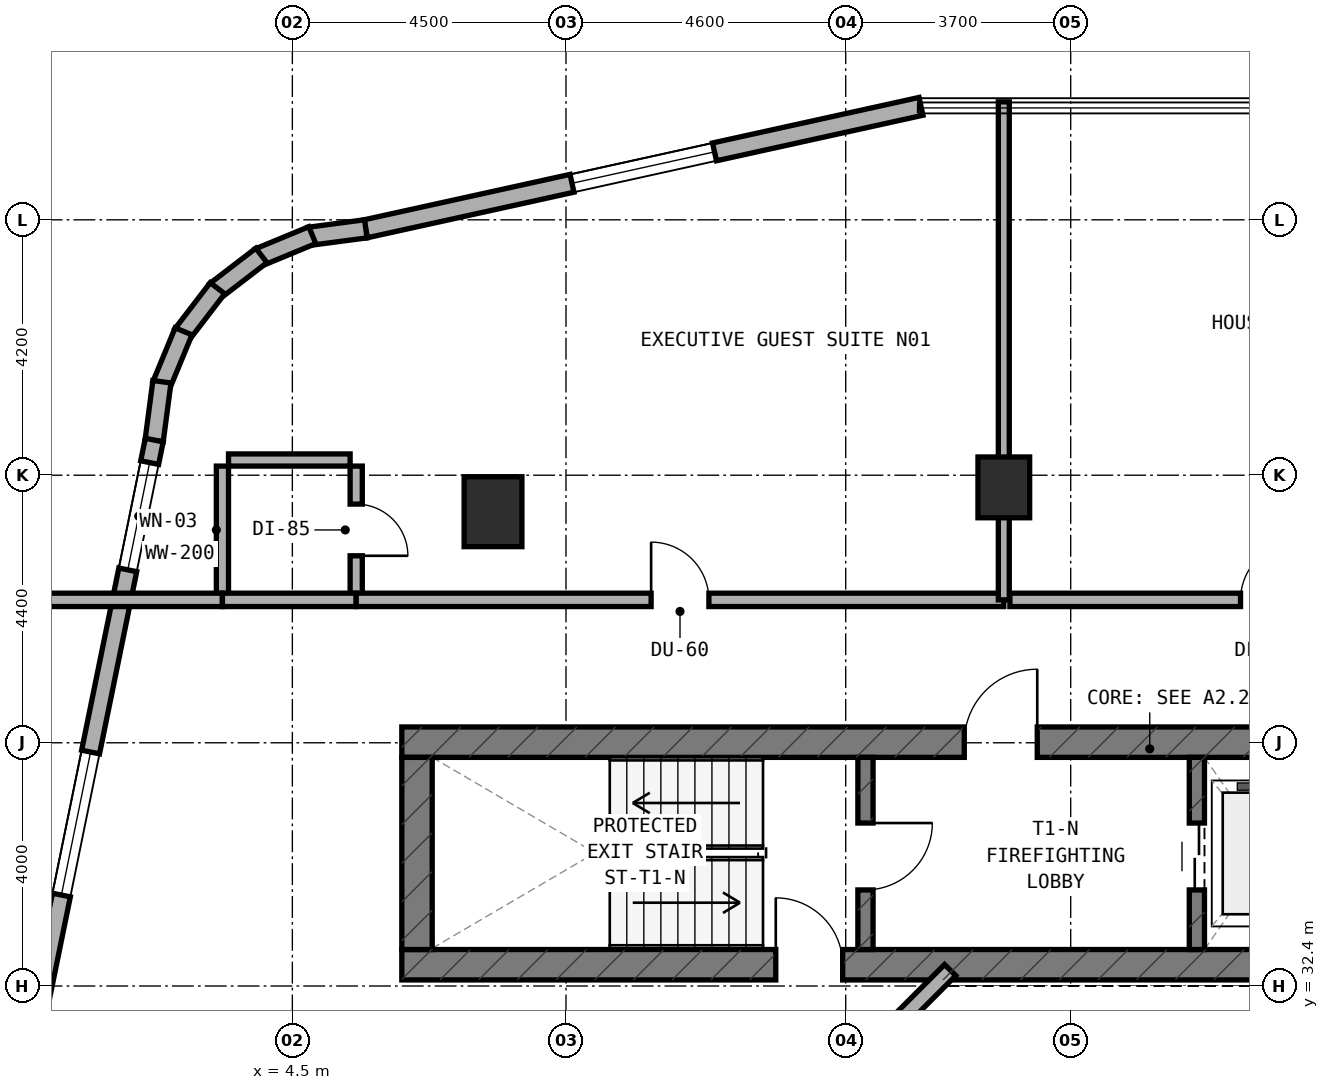
"""IFC4 building model, lengths in metres.
Left out: names, types, materials, properties, quantities, classifications, styles, units other than length and angle.
Written with IfcOpenShell. Run it as: python <this file> out.ifc"""

import sys

from ifc_helpers import new_model, si_unit, direction, frame, frame_2d, origin, origin_2d, place, context, subcontext, project, spatial, rectangle, extrude, element, fill, save


model = new_model("IFC4")
c1 = context("Model", 3, precision=1e-05, world=origin(), true_north=direction((0.0, 1.0)))
c2 = subcontext(c1, "Body", "Model", "MODEL_VIEW")
j1 = project(units=[si_unit("LENGTHUNIT", "METRE"), si_unit("PLANEANGLEUNIT", "RADIAN")], contexts=[c1])
p1 = place(None, origin())
s1 = spatial("IfcSite", under=j1, at=p1, CompositionType="ELEMENT")
p2 = place(p1, origin())
s2 = spatial("IfcBuilding", under=s1, at=p2, CompositionType="ELEMENT")
p3 = place(p2, frame((0.0, 0.0, 83.5)))
s3 = spatial("IfcBuildingStorey", under=s2, at=p3, CompositionType="ELEMENT", Elevation=83.5)
p4 = place(p3, frame((6.3, 32.75, 0.0), z_axis=(0.0, 0.0, 1.0), x_axis=(1.0, 0.0, 0.0)))
e1 = element("IfcWall", 1, at=p4, inside=s3, PredefinedType="SHEAR", context=c2, shape_type="SweptSolid", body=[
    extrude(rectangle(XDim=24.6, YDim=0.5, at=frame_2d((12.3, 0.0))), origin(), (0.0, 0.0, 1.0), 3.5),
])
p5 = place(p4, frame((6.15, 0.0, 0.0)))
e2 = element("IfcOpeningElement", 2, at=p5, cuts=e1, PredefinedType="OPENING", context=c2, shape_type="SweptSolid", body=[
    extrude(rectangle(XDim=1.1, YDim=2.15, at=frame_2d((0.55, 1.075))), frame((0.0, 0.26, 0.0), z_axis=(0.0, -1.0, 0.0), x_axis=(1.0, 0.0, 0.0)), (0.0, 0.0, 1.0), 0.52),
])
p6 = place(p3, frame((6.3, 36.41, 0.0), z_axis=(0.0, 0.0, 1.0), x_axis=(1.0, 0.0, 0.0)))
e3 = element("IfcWall", 3, at=p6, inside=s3, PredefinedType="SHEAR", context=c2, shape_type="SweptSolid", body=[
    extrude(rectangle(XDim=24.6, YDim=0.5, at=frame_2d((12.3, 0.0))), origin(), (0.0, 0.0, 1.0), 3.5),
])
p7 = place(p6, frame((9.25, 0.0, 0.0)))
e4 = element("IfcOpeningElement", 4, at=p7, cuts=e3, PredefinedType="OPENING", context=c2, shape_type="SweptSolid", body=[
    extrude(rectangle(XDim=1.2, YDim=2.15, at=frame_2d((0.6, 1.075))), frame((0.0, 0.26, 0.0), z_axis=(0.0, -1.0, 0.0), x_axis=(1.0, 0.0, 0.0)), (0.0, 0.0, 1.0), 0.52),
])
p8 = place(p6, frame((17.04, 0.0, 0.0)))
e5 = element("IfcOpeningElement", 5, at=p8, cuts=e3, PredefinedType="OPENING", context=c2, shape_type="SweptSolid", body=[
    extrude(rectangle(XDim=0.85, YDim=2.1, at=frame_2d((0.425, 1.05))), frame((0.0, 0.26, 0.0), z_axis=(0.0, -1.0, 0.0), x_axis=(1.0, 0.0, 0.0)), (0.0, 0.0, 1.0), 0.52),
])
p9 = place(p6, frame((18.883, 0.0, 0.0)))
e6 = element("IfcOpeningElement", 6, at=p9, cuts=e3, PredefinedType="OPENING", context=c2, shape_type="SweptSolid", body=[
    extrude(rectangle(XDim=1.1, YDim=2.15, at=frame_2d((0.55, 1.075))), frame((0.0, 0.26, 0.0), z_axis=(0.0, -1.0, 0.0), x_axis=(1.0, 0.0, 0.0)), (0.0, 0.0, 1.0), 0.52),
])
p10 = place(p6, frame((20.75, 0.0, 0.0)))
e7 = element("IfcOpeningElement", 7, at=p10, cuts=e3, PredefinedType="OPENING", context=c2, shape_type="SweptSolid", body=[
    extrude(rectangle(XDim=1.1, YDim=2.15, at=frame_2d((0.55, 1.075))), frame((0.0, 0.26, 0.0), z_axis=(0.0, -1.0, 0.0), x_axis=(1.0, 0.0, 0.0)), (0.0, 0.0, 1.0), 0.52),
])
p11 = place(p6, frame((22.616, 0.0, 0.0)))
e8 = element("IfcOpeningElement", 8, at=p11, cuts=e3, PredefinedType="OPENING", context=c2, shape_type="SweptSolid", body=[
    extrude(rectangle(XDim=1.1, YDim=2.15, at=frame_2d((0.55, 1.075))), frame((0.0, 0.26, 0.0), z_axis=(0.0, -1.0, 0.0), x_axis=(1.0, 0.0, 0.0)), (0.0, 0.0, 1.0), 0.52),
])
p12 = place(p3, frame((6.55, 33.0, 0.0), z_axis=(0.0, 0.0, 1.0), x_axis=(0.0, 1.0, 0.0)))
e9 = element("IfcWall", 9, at=p12, inside=s3, PredefinedType="SHEAR", context=c2, shape_type="SweptSolid", body=[
    extrude(rectangle(XDim=3.16, YDim=0.5, at=frame_2d((1.58, 0.0))), origin(), (0.0, 0.0, 1.0), 3.5),
])
p13 = place(p3, frame((13.925, 33.0, 0.0), z_axis=(0.0, 0.0, 1.0), x_axis=(0.0, 1.0, 0.0)))
e10 = element("IfcWall", 10, at=p13, inside=s3, PredefinedType="STANDARD", context=c2, shape_type="SweptSolid", body=[
    extrude(rectangle(XDim=3.16, YDim=0.25, at=frame_2d((1.58, 0.0))), origin(), (0.0, 0.0, 1.0), 3.22),
])
p14 = place(p13, frame((0.98, 0.0, 0.0)))
e11 = element("IfcOpeningElement", 11, at=p14, cuts=e10, PredefinedType="OPENING", context=c2, shape_type="SweptSolid", body=[
    extrude(rectangle(XDim=1.1, YDim=2.15, at=frame_2d((0.55, 1.075))), frame((0.0, 0.135, 0.0), z_axis=(0.0, -1.0, 0.0), x_axis=(1.0, 0.0, 0.0)), (0.0, 0.0, 1.0), 0.27),
])
p15 = place(p3, frame((19.375, 33.0, 0.0), z_axis=(0.0, 0.0, 1.0), x_axis=(0.0, 1.0, 0.0)))
e12 = element("IfcWall", 12, at=p15, inside=s3, PredefinedType="STANDARD", context=c2, shape_type="SweptSolid", body=[
    extrude(rectangle(XDim=3.16, YDim=0.25, at=frame_2d((1.58, 0.0))), origin(), (0.0, 0.0, 1.0), 3.22),
])
p16 = place(p15, frame((0.98, 0.0, 0.0)))
e13 = element("IfcOpeningElement", 13, at=p16, cuts=e12, PredefinedType="OPENING", context=c2, shape_type="SweptSolid", body=[
    extrude(rectangle(XDim=1.1, YDim=2.15, at=frame_2d((0.55, 1.075))), frame((0.0, 0.135, 0.0), z_axis=(0.0, -1.0, 0.0), x_axis=(1.0, 0.0, 0.0)), (0.0, 0.0, 1.0), 0.27),
])
p17 = place(p3, frame((16.2, 40.6, 0.0), z_axis=(0.0, 0.0, 1.0), x_axis=(1.0, 0.0, 0.0)))
e14 = element("IfcColumn", 14, at=p17, inside=s3, PredefinedType="COLUMN", context=c2, shape_type="SweptSolid", body=[
    extrude(rectangle(XDim=0.85, YDim=1.0, at=origin_2d()), origin(), (0.0, 0.0, 1.0), 3.5),
])
p18 = place(p3, frame((7.8, 40.2, 0.0), z_axis=(0.0, 0.0, 1.0), x_axis=(1.0, 0.0, 0.0)))
e15 = element("IfcColumn", 15, at=p18, inside=s3, PredefinedType="COLUMN", context=c2, shape_type="SweptSolid", body=[
    extrude(rectangle(XDim=0.95, YDim=1.15, at=origin_2d()), origin(), (0.0, 0.0, 1.0), 3.5),
])
p19 = place(p3, frame((14.838, 46.866, 0.0), z_axis=(0.0, 0.0, 1.0), x_axis=(-0.9765437942, -0.215318875183, 0.0)))
e16 = element("IfcWall", 16, at=p19, inside=s3, PredefinedType="STANDARD", context=c2, shape_type="SweptSolid", body=[
    extrude(rectangle(XDim=9.353, YDim=0.3, at=frame_2d((4.677, 0.0))), origin(), (0.0, 0.0, 1.0), 3.22),
])
p20 = place(p19, frame((3.477, 0.0, 0.8)))
e17 = element("IfcOpeningElement", 17, at=p20, cuts=e16, PredefinedType="OPENING", context=c2, shape_type="SweptSolid", body=[
    extrude(rectangle(XDim=2.4, YDim=1.6, at=frame_2d((1.2, 0.8))), frame((0.0, 0.16, 0.0), z_axis=(0.0, -1.0, 0.0), x_axis=(1.0, 0.0, 0.0)), (0.0, 0.0, 1.0), 0.32),
])
p21 = place(p3, frame((5.708, 44.852, 0.0), z_axis=(0.0, 0.0, 1.0), x_axis=(-0.991359246108, -0.131174864804, 0.0)))
e18 = element("IfcWall", 18, at=p21, inside=s3, PredefinedType="STANDARD", context=c2, shape_type="SweptSolid", body=[
    extrude(rectangle(XDim=0.938, YDim=0.3, at=frame_2d((0.469, 0.0))), origin(), (0.0, 0.0, 1.0), 3.22),
])
p22 = place(p3, frame((4.828, 44.748, 0.0), z_axis=(0.0, 0.0, 1.0), x_axis=(-0.923982547689, -0.382434636986, 0.0)))
e19 = element("IfcWall", 19, at=p22, inside=s3, PredefinedType="STANDARD", context=c2, shape_type="SweptSolid", body=[
    extrude(rectangle(XDim=0.954, YDim=0.3, at=frame_2d((0.477, 0.0))), origin(), (0.0, 0.0, 1.0), 3.22),
])
for number, where, z_axis, x_axis in (
    (20, (3.991, 44.414, 0.0), (0.0, 0.0, 1.0), (-0.794, -0.608, 0.0)),
    (21, (3.268, 43.875, 0.0), (0.0, 0.0, 1.0), (-0.608, -0.794, 0.0)),
):
    element("IfcWall", number, at=place(p3, frame(where, z_axis=z_axis, x_axis=x_axis)), inside=s3, PredefinedType="STANDARD", context=c2, shape_type="SweptSolid", body=[
        extrude(rectangle(XDim=0.955, YDim=0.3, at=frame_2d((0.478, 0.0))), origin(), (0.0, 0.0, 1.0), 3.22),
    ])
p23 = place(p3, frame((2.711, 43.166, 0.0), z_axis=(0.0, 0.0, 1.0), x_axis=(-0.382344263057, -0.924019948111, 0.0)))
e22 = element("IfcWall", 22, at=p23, inside=s3, PredefinedType="STANDARD", context=c2, shape_type="SweptSolid", body=[
    extrude(rectangle(XDim=0.955, YDim=0.3, at=frame_2d((0.477, 0.0))), origin(), (0.0, 0.0, 1.0), 3.22),
])
p24 = place(p3, frame((2.355, 42.337, 0.0), z_axis=(0.0, 0.0, 1.0), x_axis=(-0.130454512571, -0.991454295543, 0.0)))
e23 = element("IfcWall", 23, at=p24, inside=s3, PredefinedType="STANDARD", context=c2, shape_type="SweptSolid", body=[
    extrude(rectangle(XDim=0.973, YDim=0.3, at=frame_2d((0.487, 0.0))), origin(), (0.0, 0.0, 1.0), 3.22),
])
p25 = place(p3, frame((2.229, 41.378, 0.0), z_axis=(0.0, 0.0, 1.0), x_axis=(-0.199990901713, -0.979797754249, 0.0)))
e24 = element("IfcWall", 24, at=p25, inside=s3, PredefinedType="STANDARD", context=c2, shape_type="SweptSolid", body=[
    extrude(rectangle(XDim=10.065, YDim=0.3, at=frame_2d((5.033, 0.0))), origin(), (0.0, 0.0, 1.0), 3.22),
])
p26 = place(p25, frame((0.378, 0.0, 0.85)))
e25 = element("IfcOpeningElement", 25, at=p26, cuts=e24, PredefinedType="OPENING", context=c2, shape_type="SweptSolid", body=[
    extrude(rectangle(XDim=1.8, YDim=1.5, at=frame_2d((0.9, 0.75))), frame((0.0, 0.16, 0.0), z_axis=(0.0, -1.0, 0.0), x_axis=(1.0, 0.0, 0.0)), (0.0, 0.0, 1.0), 0.32),
])
p27 = place(p25, frame((5.236, 0.0, 0.8)))
e26 = element("IfcOpeningElement", 26, at=p27, cuts=e24, PredefinedType="OPENING", context=c2, shape_type="SweptSolid", body=[
    extrude(rectangle(XDim=2.4, YDim=1.6, at=frame_2d((1.2, 0.8))), frame((0.0, 0.16, 0.0), z_axis=(0.0, -1.0, 0.0), x_axis=(1.0, 0.0, 0.0)), (0.0, 0.0, 1.0), 0.32),
])
p28 = place(p3, frame((15.318, 32.662, 0.0), z_axis=(0.0, 0.0, 1.0), x_axis=(-0.707106781187, -0.707106781187, 0.0)))
e27 = element("IfcWall", 27, at=p28, inside=s3, PredefinedType="STANDARD", context=c2, shape_type="SweptSolid", body=[
    extrude(rectangle(XDim=2.594, YDim=0.26, at=frame_2d((1.297, 0.0))), origin(), (0.0, 0.0, 1.0), 3.22),
])
p29 = place(p3, frame((5.55, 38.85, 0.0), z_axis=(0.0, 0.0, 1.0), x_axis=(0.0, 1.0, 0.0)))
e28 = element("IfcWall", 28, at=p29, inside=s3, PredefinedType="PLUMBINGWALL", context=c2, shape_type="SweptSolid", body=[
    extrude(rectangle(XDim=2.1, YDim=0.2, at=frame_2d((1.05, 0.0))), origin(), (0.0, 0.0, 1.0), 3.22),
])
p30 = place(p29, frame((0.625, 0.0, 0.0)))
e29 = element("IfcOpeningElement", 29, at=p30, cuts=e28, PredefinedType="OPENING", context=c2, shape_type="SweptSolid", body=[
    extrude(rectangle(XDim=0.85, YDim=2.1, at=frame_2d((0.425, 1.05))), frame((0.0, 0.11, 0.0), z_axis=(0.0, -1.0, 0.0), x_axis=(1.0, 0.0, 0.0)), (0.0, 0.0, 1.0), 0.22),
])
p31 = place(p3, frame((3.45, 41.05, 0.0), z_axis=(0.0, 0.0, 1.0), x_axis=(1.0, 0.0, 0.0)))
e30 = element("IfcWall", 30, at=p31, inside=s3, PredefinedType="PLUMBINGWALL", context=c2, shape_type="SweptSolid", body=[
    extrude(rectangle(XDim=2.0, YDim=0.2, at=frame_2d((1.0, 0.0))), origin(), (0.0, 0.0, 1.0), 3.22),
])
p32 = place(p3, frame((3.35, 38.85, 0.0), z_axis=(0.0, 0.0, 1.0), x_axis=(0.0, 1.0, 0.0)))
e31 = element("IfcWall", 31, at=p32, inside=s3, PredefinedType="PLUMBINGWALL", context=c2, shape_type="SweptSolid", body=[
    extrude(rectangle(XDim=2.1, YDim=0.2, at=frame_2d((1.05, 0.0))), origin(), (0.0, 0.0, 1.0), 3.22),
])
p33 = place(p3, frame((0.24, 38.75, 0.0), z_axis=(0.0, 0.0, 1.0), x_axis=(1.0, 0.0, 0.0)))
e32 = element("IfcWall", 32, at=p33, inside=s3, PredefinedType="SOLIDWALL", context=c2, shape_type="SweptSolid", body=[
    extrude(rectangle(XDim=3.11, YDim=0.22, at=frame_2d((1.555, 0.0))), origin(), (0.0, 0.0, 1.0), 3.22),
])
p34 = place(p3, frame((3.35, 38.75, 0.0), z_axis=(0.0, 0.0, 1.0), x_axis=(1.0, 0.0, 0.0)))
e33 = element("IfcWall", 33, at=p34, inside=s3, PredefinedType="SOLIDWALL", context=c2, shape_type="SweptSolid", body=[
    extrude(rectangle(XDim=2.2, YDim=0.22, at=frame_2d((1.1, 0.0))), origin(), (0.0, 0.0, 1.0), 3.22),
])
p35 = place(p3, frame((5.55, 38.75, 0.0), z_axis=(0.0, 0.0, 1.0), x_axis=(1.0, 0.0, 0.0)))
e34 = element("IfcWall", 34, at=p35, inside=s3, PredefinedType="SOLIDWALL", context=c2, shape_type="SweptSolid", body=[
    extrude(rectangle(XDim=10.65, YDim=0.22, at=frame_2d((5.325, 0.0))), origin(), (0.0, 0.0, 1.0), 2.595),
])
p36 = place(p35, frame((4.85, 0.0, 0.0)))
e35 = element("IfcOpeningElement", 35, at=p36, cuts=e34, PredefinedType="OPENING", context=c2, shape_type="SweptSolid", body=[
    extrude(rectangle(XDim=0.95, YDim=2.1, at=frame_2d((0.475, 1.05))), frame((0.0, 0.12, 0.0), z_axis=(0.0, -1.0, 0.0), x_axis=(1.0, 0.0, 0.0)), (0.0, 0.0, 1.0), 0.24),
])
p37 = place(p3, frame((16.2, 38.75, 0.0), z_axis=(0.0, 0.0, 1.0), x_axis=(0.0, 1.0, 0.0)))
e36 = element("IfcWall", 36, at=p37, inside=s3, PredefinedType="SOLIDWALL", context=c2, shape_type="SweptSolid", body=[
    extrude(rectangle(XDim=8.19, YDim=0.18, at=frame_2d((4.095, 0.0))), origin(), (0.0, 0.0, 1.0), 2.595),
])
p38 = place(p3, frame((16.3, 38.75, 0.0), z_axis=(0.0, 0.0, 1.0), x_axis=(1.0, 0.0, 0.0)))
e37 = element("IfcWall", 37, at=p38, inside=s3, PredefinedType="SOLIDWALL", context=c2, shape_type="SweptSolid", body=[
    extrude(rectangle(XDim=9.4, YDim=0.22, at=frame_2d((4.7, 0.0))), origin(), (0.0, 0.0, 1.0), 2.835),
])
p39 = place(p38, frame((3.793, 0.0, 0.0)))
e38 = element("IfcOpeningElement", 38, at=p39, cuts=e37, PredefinedType="OPENING", context=c2, shape_type="SweptSolid", body=[
    extrude(rectangle(XDim=0.95, YDim=2.1, at=frame_2d((0.475, 1.05))), frame((0.0, 0.12, 0.0), z_axis=(0.0, -1.0, 0.0), x_axis=(1.0, 0.0, 0.0)), (0.0, 0.0, 1.0), 0.24),
])
p40 = place(p20, origin())
e39 = element("IfcWindow", 39, at=p40, inside=s3, PartitioningType="SINGLE_PANEL", PredefinedType="WINDOW", context=c2, shape_type="SweptSolid", body=[
    extrude(rectangle(XDim=2.4, YDim=1.6, at=frame_2d((1.2, 0.8))), frame((0.0, 0.03, 0.0), z_axis=(0.0, -1.0, 0.0), x_axis=(1.0, 0.0, 0.0)), (0.0, 0.0, 1.0), 0.06),
])
fill(e17, e39)
p41 = place(p26, origin())
e40 = element("IfcWindow", 40, at=p41, inside=s3, PartitioningType="SINGLE_PANEL", PredefinedType="WINDOW", context=c2, shape_type="SweptSolid", body=[
    extrude(rectangle(XDim=1.8, YDim=1.5, at=frame_2d((0.9, 0.75))), frame((0.0, 0.03, 0.0), z_axis=(0.0, -1.0, 0.0), x_axis=(1.0, 0.0, 0.0)), (0.0, 0.0, 1.0), 0.06),
])
fill(e25, e40)
p42 = place(p27, origin())
e41 = element("IfcWindow", 41, at=p42, inside=s3, PartitioningType="SINGLE_PANEL", PredefinedType="WINDOW", context=c2, shape_type="SweptSolid", body=[
    extrude(rectangle(XDim=2.4, YDim=1.6, at=frame_2d((1.2, 0.8))), frame((0.0, 0.03, 0.0), z_axis=(0.0, -1.0, 0.0), x_axis=(1.0, 0.0, 0.0)), (0.0, 0.0, 1.0), 0.06),
])
fill(e26, e41)
p43 = place(p14, frame((1.1, 0.0, 0.0), z_axis=(0.0, 0.0, 1.0), x_axis=(-1.0, 0.0, 0.0)))
e42 = element("IfcDoor", 42, at=p43, inside=s3, OperationType="SINGLE_SWING_LEFT", PredefinedType="DOOR", context=c2, shape_type="SweptSolid", body=[
    extrude(rectangle(XDim=1.1, YDim=2.15, at=frame_2d((0.55, 1.075))), frame((0.0, 0.025, 0.0), z_axis=(0.0, -1.0, 0.0), x_axis=(1.0, 0.0, 0.0)), (0.0, 0.0, 1.0), 0.05),
])
fill(e11, e42)
p44 = place(p7, origin())
e43 = element("IfcDoor", 43, at=p44, inside=s3, OperationType="SINGLE_SWING_RIGHT", PredefinedType="DOOR", context=c2, shape_type="SweptSolid", body=[
    extrude(rectangle(XDim=1.2, YDim=2.15, at=frame_2d((0.6, 1.075))), frame((0.0, 0.025, 0.0), z_axis=(0.0, -1.0, 0.0), x_axis=(1.0, 0.0, 0.0)), (0.0, 0.0, 1.0), 0.05),
])
fill(e4, e43)
p45 = place(p16, origin())
e44 = element("IfcDoor", 44, at=p45, inside=s3, OperationType="DOUBLE_DOOR_SLIDING", PredefinedType="DOOR", context=c2, shape_type="SweptSolid", body=[
    extrude(rectangle(XDim=1.1, YDim=2.15, at=frame_2d((0.55, 1.075))), frame((0.0, 0.025, 0.0), z_axis=(0.0, -1.0, 0.0), x_axis=(1.0, 0.0, 0.0)), (0.0, 0.0, 1.0), 0.05),
])
fill(e13, e44)
p46 = place(p5, origin())
e45 = element("IfcDoor", 45, at=p46, inside=s3, OperationType="SINGLE_SWING_LEFT", PredefinedType="DOOR", context=c2, shape_type="SweptSolid", body=[
    extrude(rectangle(XDim=1.1, YDim=2.15, at=frame_2d((0.55, 1.075))), frame((0.0, 0.025, 0.0), z_axis=(0.0, -1.0, 0.0), x_axis=(1.0, 0.0, 0.0)), (0.0, 0.0, 1.0), 0.05),
])
fill(e2, e45)
p47 = place(p30, frame((0.85, 0.0, 0.0), z_axis=(0.0, 0.0, 1.0), x_axis=(-1.0, 0.0, 0.0)))
e46 = element("IfcDoor", 46, at=p47, inside=s3, OperationType="SINGLE_SWING_RIGHT", PredefinedType="DOOR", context=c2, shape_type="SweptSolid", body=[
    extrude(rectangle(XDim=0.85, YDim=2.1, at=frame_2d((0.425, 1.05))), frame((0.0, 0.025, 0.0), z_axis=(0.0, -1.0, 0.0), x_axis=(1.0, 0.0, 0.0)), (0.0, 0.0, 1.0), 0.05),
])
fill(e29, e46)
p48 = place(p36, origin())
e47 = element("IfcDoor", 47, at=p48, inside=s3, OperationType="SINGLE_SWING_LEFT", PredefinedType="DOOR", context=c2, shape_type="SweptSolid", body=[
    extrude(rectangle(XDim=0.95, YDim=2.1, at=frame_2d((0.475, 1.05))), frame((0.0, 0.025, 0.0), z_axis=(0.0, -1.0, 0.0), x_axis=(1.0, 0.0, 0.0)), (0.0, 0.0, 1.0), 0.05),
])
fill(e35, e47)
p49 = place(p39, origin())
e48 = element("IfcDoor", 48, at=p49, inside=s3, OperationType="SINGLE_SWING_RIGHT", PredefinedType="DOOR", context=c2, shape_type="SweptSolid", body=[
    extrude(rectangle(XDim=0.95, YDim=2.1, at=frame_2d((0.475, 1.05))), frame((0.0, 0.025, 0.0), z_axis=(0.0, -1.0, 0.0), x_axis=(1.0, 0.0, 0.0)), (0.0, 0.0, 1.0), 0.05),
])
fill(e38, e48)
save(model, sys.argv[1])
